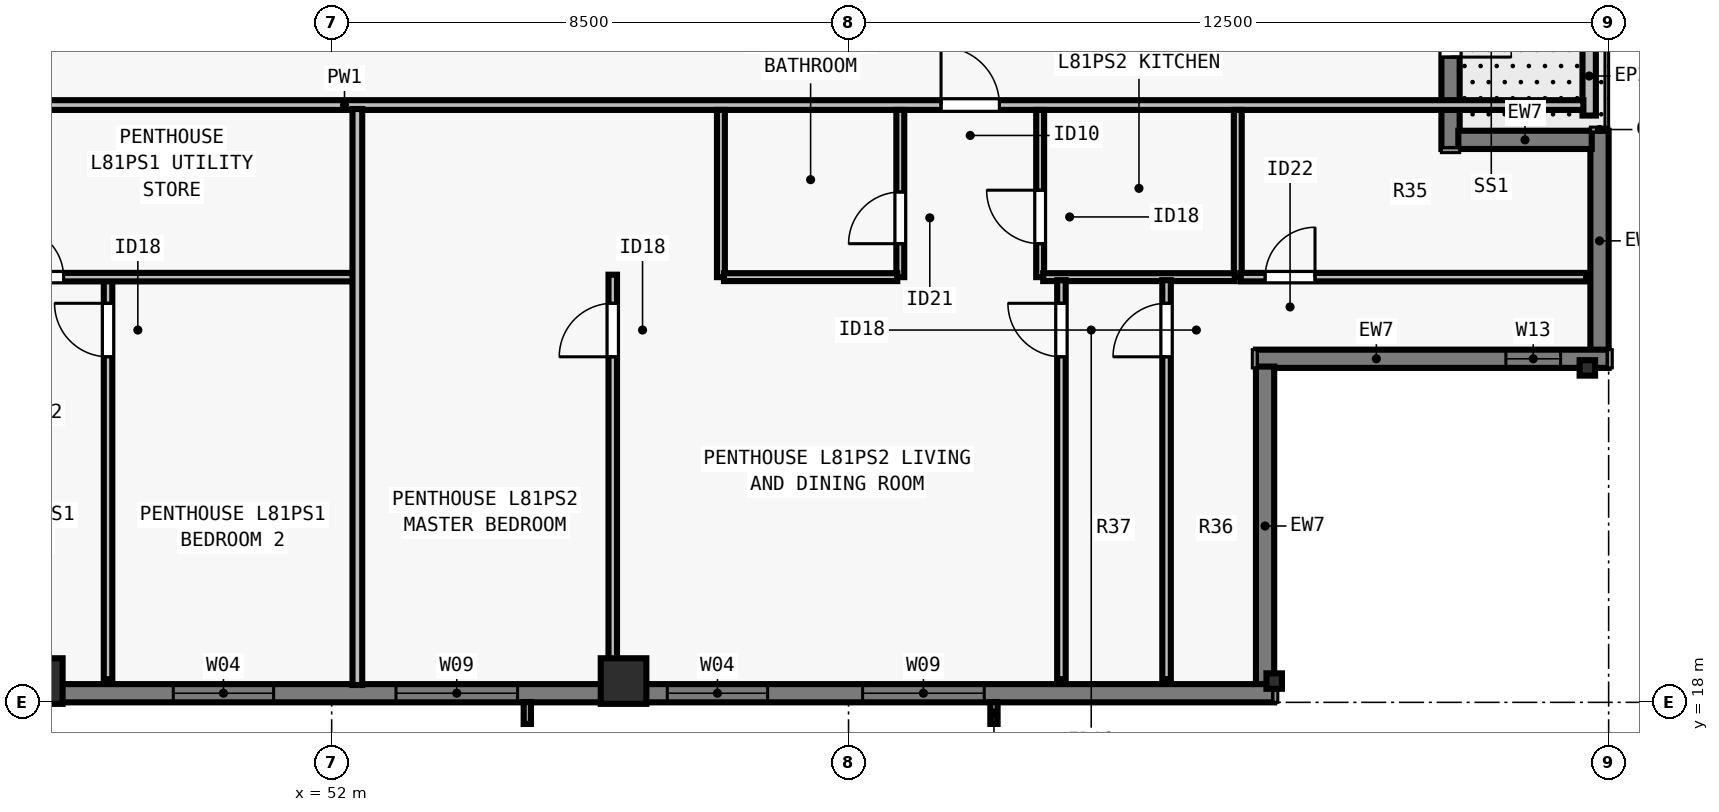
"""IFC4 building model, lengths in metres.
Left out: names, types, materials, properties, quantities, classifications, styles, units other than length and angle.
Written with IfcOpenShell. Run it as: python <this file> out.ifc"""

import sys

from ifc_helpers import new_model, si_unit, direction, frame, frame_2d, origin, origin_2d, place, context, subcontext, project, spatial, rectangle, i_section, extrude, element, fill, save


model = new_model("IFC4")
c1 = context("Model", 3, precision=1e-05, world=origin(), true_north=direction((0.0, 1.0)))
c2 = subcontext(c1, "Body", "Model", "MODEL_VIEW")
j1 = project(units=[si_unit("LENGTHUNIT", "METRE"), si_unit("PLANEANGLEUNIT", "RADIAN")], contexts=[c1])
p1 = place(None, origin())
s1 = spatial("IfcSite", under=j1, at=p1, CompositionType="ELEMENT")
p2 = place(p1, origin())
s2 = spatial("IfcBuilding", under=s1, at=p2, CompositionType="ELEMENT")
p3 = place(p2, frame((0.0, 0.0, 294.5)))
s3 = spatial("IfcBuildingStorey", under=s2, at=p3, CompositionType="ELEMENT", Elevation=294.5)
for number, where, z_axis, x_axis in (
    (1, (47.2, 18.35, 0.0), (0.0, 0.0, 1.0), (1.0, 0.0, 0.0)),
    (2, (56.8, 18.35, 0.0), (0.0, 0.0, 1.0), (1.0, 0.0, 0.0)),
):
    element("IfcColumn", number, at=place(p3, frame(where, z_axis=z_axis, x_axis=x_axis)), inside=s3, PredefinedType="COLUMN", context=c2, shape_type="SweptSolid", body=[
        extrude(rectangle(XDim=0.75, YDim=0.75, at=origin_2d()), origin(), (0.0, 0.0, 1.0), 3.5),
    ])
for number, where, z_axis, x_axis in (
    (3, (67.5, 18.35, 0.0), (0.0, 0.0, 1.0), (1.0, 0.0, 0.0)),
    (4, (72.65, 23.5, 0.0), (0.0, 0.0, 1.0), (0.0, 1.0, 0.0)),
):
    element("IfcColumn", number, at=place(p3, frame(where, z_axis=z_axis, x_axis=x_axis)), inside=s3, PredefinedType="COLUMN", context=c2, shape_type="SweptSolid", body=[
        extrude(i_section(OverallWidth=0.254, OverallDepth=0.254, WebThickness=0.009, FlangeThickness=0.014, FilletRadius=0.013, at=origin_2d()), origin(), (0.0, 0.0, 1.0), 3.5),
    ])
p4 = place(p3, frame((72.85, 27.4, 0.0), z_axis=(0.0, 0.0, 1.0), x_axis=(0.0, -1.0, 0.0)))
e5 = element("IfcWall", 5, at=p4, inside=s3, PredefinedType="SOLIDWALL", context=c2, shape_type="SweptSolid", body=[
    extrude(rectangle(XDim=3.622, YDim=0.3, at=frame_2d((1.811, 0.0))), origin(), (0.0, 0.0, 1.0), 3.29),
])
p5 = place(p3, frame((73.0, 23.65, 0.0), z_axis=(0.0, 0.0, 1.0), x_axis=(-1.0, 0.0, 0.0)))
e6 = element("IfcWall", 6, at=p5, inside=s3, PredefinedType="SOLIDWALL", context=c2, shape_type="SweptSolid", body=[
    extrude(rectangle(XDim=5.8, YDim=0.3, at=frame_2d((2.9, 0.0))), origin(), (0.0, 0.0, 1.0), 3.29),
])
p6 = place(p5, frame((0.79, 0.0, 0.8)))
e7 = element("IfcOpeningElement", 7, at=p6, cuts=e6, PredefinedType="OPENING", context=c2, shape_type="SweptSolid", body=[
    extrude(rectangle(XDim=0.9, YDim=1.75, at=frame_2d((0.45, 0.875))), frame((0.0, 0.16, 0.0), z_axis=(0.0, -1.0, 0.0), x_axis=(1.0, 0.0, 0.0)), (0.0, 0.0, 1.0), 0.32),
])
p7 = place(p3, frame((67.35, 23.522, 0.0), z_axis=(0.0, 0.0, 1.0), x_axis=(0.0, -1.0, 0.0)))
e8 = element("IfcWall", 8, at=p7, inside=s3, PredefinedType="SOLIDWALL", context=c2, shape_type="SweptSolid", body=[
    extrude(rectangle(XDim=5.244, YDim=0.3, at=frame_2d((2.622, 0.0))), origin(), (0.0, 0.0, 1.0), 3.29),
])
p8 = place(p3, frame((67.5, 18.15, 0.0), z_axis=(0.0, 0.0, 1.0), x_axis=(-1.0, 0.0, 0.0)))
e9 = element("IfcWall", 9, at=p8, inside=s3, PredefinedType="SOLIDWALL", context=c2, shape_type="SweptSolid", body=[
    extrude(rectangle(XDim=30.722, YDim=0.3, at=frame_2d((15.361, 0.0))), origin(), (0.0, 0.0, 1.0), 3.29),
])
p9 = place(p8, frame((4.769, 0.0, 0.8)))
e10 = element("IfcOpeningElement", 10, at=p9, cuts=e9, PredefinedType="OPENING", context=c2, shape_type="SweptSolid", body=[
    extrude(rectangle(XDim=2.0, YDim=1.758, at=frame_2d((1.0, 0.879))), frame((0.0, 0.16, 0.0), z_axis=(0.0, -1.0, 0.0), x_axis=(1.0, 0.0, 0.0)), (0.0, 0.0, 1.0), 0.32),
])
p10 = place(p8, frame((8.331, 0.0, 0.8)))
e11 = element("IfcOpeningElement", 11, at=p10, cuts=e9, PredefinedType="OPENING", context=c2, shape_type="SweptSolid", body=[
    extrude(rectangle(XDim=1.65, YDim=1.758, at=frame_2d((0.825, 0.879))), frame((0.0, 0.16, 0.0), z_axis=(0.0, -1.0, 0.0), x_axis=(1.0, 0.0, 0.0)), (0.0, 0.0, 1.0), 0.32),
])
p11 = place(p8, frame((12.442, 0.0, 0.8)))
e12 = element("IfcOpeningElement", 12, at=p11, cuts=e9, PredefinedType="OPENING", context=c2, shape_type="SweptSolid", body=[
    extrude(rectangle(XDim=2.0, YDim=1.758, at=frame_2d((1.0, 0.879))), frame((0.0, 0.16, 0.0), z_axis=(0.0, -1.0, 0.0), x_axis=(1.0, 0.0, 0.0)), (0.0, 0.0, 1.0), 0.32),
])
p12 = place(p8, frame((16.455, 0.0, 0.8)))
e13 = element("IfcOpeningElement", 13, at=p12, cuts=e9, PredefinedType="OPENING", context=c2, shape_type="SweptSolid", body=[
    extrude(rectangle(XDim=1.65, YDim=1.758, at=frame_2d((0.825, 0.879))), frame((0.0, 0.16, 0.0), z_axis=(0.0, -1.0, 0.0), x_axis=(1.0, 0.0, 0.0)), (0.0, 0.0, 1.0), 0.32),
])
p13 = place(p8, frame((20.967, 0.0, 0.8)))
e14 = element("IfcOpeningElement", 14, at=p13, cuts=e9, PredefinedType="OPENING", context=c2, shape_type="SweptSolid", body=[
    extrude(rectangle(XDim=2.0, YDim=1.758, at=frame_2d((1.0, 0.879))), frame((0.0, 0.16, 0.0), z_axis=(0.0, -1.0, 0.0), x_axis=(1.0, 0.0, 0.0)), (0.0, 0.0, 1.0), 0.32),
])
p14 = place(p8, frame((24.128, 0.0, 0.8)))
e15 = element("IfcOpeningElement", 15, at=p14, cuts=e9, PredefinedType="OPENING", context=c2, shape_type="SweptSolid", body=[
    extrude(rectangle(XDim=1.65, YDim=1.758, at=frame_2d((0.825, 0.879))), frame((0.0, 0.16, 0.0), z_axis=(0.0, -1.0, 0.0), x_axis=(1.0, 0.0, 0.0)), (0.0, 0.0, 1.0), 0.32),
])
p15 = place(p3, frame((70.4, 32.822, 0.0), z_axis=(0.0, 0.0, 1.0), x_axis=(0.0, -1.0, 0.0)))
e16 = element("IfcWall", 16, at=p15, inside=s3, PredefinedType="SOLIDWALL", context=c2, shape_type="SweptSolid", body=[
    extrude(rectangle(XDim=5.722, YDim=0.3, at=frame_2d((2.861, 0.0))), origin(), (0.0, 0.0, 1.0), 3.29),
])
p16 = place(p15, frame((3.211, 0.0, 0.0)))
e17 = element("IfcOpeningElement", 17, at=p16, cuts=e16, PredefinedType="OPENING", context=c2, shape_type="SweptSolid", body=[
    extrude(rectangle(XDim=1.0, YDim=2.15, at=frame_2d((0.5, 1.075))), frame((0.0, 0.16, 0.0), z_axis=(0.0, -1.0, 0.0), x_axis=(1.0, 0.0, 0.0)), (0.0, 0.0, 1.0), 0.32),
])
p17 = place(p3, frame((70.528, 27.25, 0.0), z_axis=(0.0, 0.0, 1.0), x_axis=(1.0, 0.0, 0.0)))
e18 = element("IfcWall", 18, at=p17, inside=s3, PredefinedType="SOLIDWALL", context=c2, shape_type="SweptSolid", body=[
    extrude(rectangle(XDim=2.194, YDim=0.3, at=frame_2d((1.097, 0.0))), origin(), (0.0, 0.0, 1.0), 3.29),
])
p18 = place(p3, frame((72.68, 27.65, 0.0), z_axis=(0.0, 0.0, 1.0), x_axis=(0.0, 1.0, 0.0)))
e19 = element("IfcWall", 19, at=p18, inside=s3, PredefinedType="PARAPET", context=c2, shape_type="SweptSolid", body=[
    extrude(rectangle(XDim=1.3, YDim=0.22, at=frame_2d((0.65, 0.0))), origin(), (0.0, 0.0, 1.0), 0.55),
])
p19 = place(p3, frame((31.285, 27.823, 0.0), z_axis=(0.0, 0.0, 1.0), x_axis=(1.0, 0.0, 0.0)))
e20 = element("IfcWall", 20, at=p19, inside=s3, PredefinedType="PARTITIONING", context=c2, shape_type="SweptSolid", body=[
    extrude(rectangle(XDim=41.3, YDim=0.16, at=frame_2d((20.65, 0.0))), origin(), (0.0, 0.0, 1.0), 3.009),
])
p20 = place(p19, frame((10.156, 0.0, 0.0)))
e21 = element("IfcOpeningElement", 21, at=p20, cuts=e20, PredefinedType="OPENING", context=c2, shape_type="SweptSolid", body=[
    extrude(rectangle(XDim=0.96, YDim=2.18, at=frame_2d((0.48, 1.09))), frame((0.0, 0.09, 0.0), z_axis=(0.0, -1.0, 0.0), x_axis=(1.0, 0.0, 0.0)), (0.0, 0.0, 1.0), 0.18),
])
p21 = place(p19, frame((30.736, 0.0, 0.0)))
e22 = element("IfcOpeningElement", 22, at=p21, cuts=e20, PredefinedType="OPENING", context=c2, shape_type="SweptSolid", body=[
    extrude(rectangle(XDim=0.96, YDim=2.18, at=frame_2d((0.48, 1.09))), frame((0.0, 0.09, 0.0), z_axis=(0.0, -1.0, 0.0), x_axis=(1.0, 0.0, 0.0)), (0.0, 0.0, 1.0), 0.18),
])
p22 = place(p3, frame((48.323, 18.38, 0.0), z_axis=(0.0, 0.0, 1.0), x_axis=(0.0, 1.0, 0.0)))
e23 = element("IfcWall", 23, at=p22, inside=s3, PredefinedType="PARTITIONING", context=c2, shape_type="SweptSolid", body=[
    extrude(rectangle(XDim=6.653, YDim=0.14, at=frame_2d((3.326, 0.0))), origin(), (0.0, 0.0, 1.0), 3.009),
])
p23 = place(p22, frame((5.302, 0.0, 0.0)))
e24 = element("IfcOpeningElement", 24, at=p23, cuts=e23, PredefinedType="OPENING", context=c2, shape_type="SweptSolid", body=[
    extrude(rectangle(XDim=0.88, YDim=2.1, at=frame_2d((0.44, 1.05))), frame((0.0, 0.08, 0.0), z_axis=(0.0, -1.0, 0.0), x_axis=(1.0, 0.0, 0.0)), (0.0, 0.0, 1.0), 0.16),
])
p24 = place(p3, frame((46.371, 24.992, 0.0), z_axis=(0.0, 0.0, 1.0), x_axis=(1.0, 0.0, 0.0)))
e25 = element("IfcWall", 25, at=p24, inside=s3, PredefinedType="PARTITIONING", context=c2, shape_type="SweptSolid", body=[
    extrude(rectangle(XDim=6.101, YDim=0.14, at=frame_2d((3.051, 0.0))), origin(), (0.0, 0.0, 1.0), 3.29),
])
p25 = place(p24, frame((0.4, 0.0, 0.0)))
e26 = element("IfcOpeningElement", 26, at=p25, cuts=e25, PredefinedType="OPENING", context=c2, shape_type="SweptSolid", body=[
    extrude(rectangle(XDim=0.82, YDim=2.1, at=frame_2d((0.41, 1.05))), frame((0.0, 0.08, 0.0), z_axis=(0.0, -1.0, 0.0), x_axis=(1.0, 0.0, 0.0)), (0.0, 0.0, 1.0), 0.16),
])
p26 = place(p3, frame((52.423, 18.285, 0.0), z_axis=(0.0, 0.0, 1.0), x_axis=(0.0, 1.0, 0.0)))
e27 = element("IfcWall", 27, at=p26, inside=s3, PredefinedType="PARTITIONING", context=c2, shape_type="SweptSolid", body=[
    extrude(rectangle(XDim=9.473, YDim=0.16, at=frame_2d((4.736, 0.0))), origin(), (0.0, 0.0, 1.0), 3.009),
])
p27 = place(p3, frame((58.401, 24.992, 0.0), z_axis=(0.0, 0.0, 1.0), x_axis=(0.0, 1.0, 0.0)))
e28 = element("IfcWall", 28, at=p27, inside=s3, PredefinedType="PLUMBINGWALL", context=c2, shape_type="SweptSolid", body=[
    extrude(rectangle(XDim=2.75, YDim=0.13, at=frame_2d((1.375, 0.0))), origin(), (0.0, 0.0, 1.0), 3.29),
])
p28 = place(p3, frame((61.351, 24.992, 0.0), z_axis=(0.0, 0.0, 1.0), x_axis=(0.0, 1.0, 0.0)))
e29 = element("IfcWall", 29, at=p28, inside=s3, PredefinedType="PLUMBINGWALL", context=c2, shape_type="SweptSolid", body=[
    extrude(rectangle(XDim=2.75, YDim=0.13, at=frame_2d((1.375, 0.0))), origin(), (0.0, 0.0, 1.0), 3.29),
])
p29 = place(p28, frame((0.55, 0.0, 0.0)))
e30 = element("IfcOpeningElement", 30, at=p29, cuts=e29, PredefinedType="OPENING", context=c2, shape_type="SweptSolid", body=[
    extrude(rectangle(XDim=0.85, YDim=2.08, at=frame_2d((0.425, 1.04))), frame((0.0, 0.075, 0.0), z_axis=(0.0, -1.0, 0.0), x_axis=(1.0, 0.0, 0.0)), (0.0, 0.0, 1.0), 0.15),
])
p30 = place(p3, frame((58.451, 24.992, 0.0), z_axis=(0.0, 0.0, 1.0), x_axis=(1.0, 0.0, 0.0)))
e31 = element("IfcWall", 31, at=p30, inside=s3, PredefinedType="PLUMBINGWALL", context=c2, shape_type="SweptSolid", body=[
    extrude(rectangle(XDim=2.85, YDim=0.13, at=frame_2d((1.425, 0.0))), origin(), (0.0, 0.0, 1.0), 3.29),
])
p31 = place(p3, frame((66.901, 24.992, 0.0), z_axis=(0.0, 0.0, 1.0), x_axis=(0.0, 1.0, 0.0)))
e32 = element("IfcWall", 32, at=p31, inside=s3, PredefinedType="PLUMBINGWALL", context=c2, shape_type="SweptSolid", body=[
    extrude(rectangle(XDim=2.75, YDim=0.13, at=frame_2d((1.375, 0.0))), origin(), (0.0, 0.0, 1.0), 3.29),
])
p32 = place(p3, frame((63.651, 24.992, 0.0), z_axis=(0.0, 0.0, 1.0), x_axis=(0.0, 1.0, 0.0)))
e33 = element("IfcWall", 33, at=p32, inside=s3, PredefinedType="PLUMBINGWALL", context=c2, shape_type="SweptSolid", body=[
    extrude(rectangle(XDim=2.75, YDim=0.13, at=frame_2d((1.375, 0.0))), origin(), (0.0, 0.0, 1.0), 2.653),
])
p33 = place(p32, frame((0.55, 0.0, 0.0)))
e34 = element("IfcOpeningElement", 34, at=p33, cuts=e33, PredefinedType="OPENING", context=c2, shape_type="SweptSolid", body=[
    extrude(rectangle(XDim=0.88, YDim=2.1, at=frame_2d((0.44, 1.05))), frame((0.0, 0.075, 0.0), z_axis=(0.0, -1.0, 0.0), x_axis=(1.0, 0.0, 0.0)), (0.0, 0.0, 1.0), 0.15),
])
p34 = place(p3, frame((63.701, 24.992, 0.0), z_axis=(0.0, 0.0, 1.0), x_axis=(1.0, 0.0, 0.0)))
e35 = element("IfcWall", 35, at=p34, inside=s3, PredefinedType="PLUMBINGWALL", context=c2, shape_type="SweptSolid", body=[
    extrude(rectangle(XDim=3.15, YDim=0.13, at=frame_2d((1.575, 0.0))), origin(), (0.0, 0.0, 1.0), 3.29),
])
p35 = place(p3, frame((56.623, 18.38, 0.0), z_axis=(0.0, 0.0, 1.0), x_axis=(0.0, 1.0, 0.0)))
e36 = element("IfcWall", 36, at=p35, inside=s3, PredefinedType="PARTITIONING", context=c2, shape_type="SweptSolid", body=[
    extrude(rectangle(XDim=6.653, YDim=0.14, at=frame_2d((3.326, 0.0))), origin(), (0.0, 0.0, 1.0), 2.653),
])
p36 = place(p35, frame((5.302, 0.0, 0.0)))
e37 = element("IfcOpeningElement", 37, at=p36, cuts=e36, PredefinedType="OPENING", context=c2, shape_type="SweptSolid", body=[
    extrude(rectangle(XDim=0.88, YDim=2.1, at=frame_2d((0.44, 1.05))), frame((0.0, 0.08, 0.0), z_axis=(0.0, -1.0, 0.0), x_axis=(1.0, 0.0, 0.0)), (0.0, 0.0, 1.0), 0.16),
])
p37 = place(p3, frame((65.73, 18.38, 0.0), z_axis=(0.0, 0.0, 1.0), x_axis=(0.0, 1.0, 0.0)))
e38 = element("IfcWall", 38, at=p37, inside=s3, PredefinedType="PARTITIONING", context=c2, shape_type="SweptSolid", body=[
    extrude(rectangle(XDim=6.562, YDim=0.14, at=frame_2d((3.281, 0.0))), origin(), (0.0, 0.0, 1.0), 2.653),
])
p38 = place(p37, frame((5.302, 0.0, 0.0)))
e39 = element("IfcOpeningElement", 39, at=p38, cuts=e38, PredefinedType="OPENING", context=c2, shape_type="SweptSolid", body=[
    extrude(rectangle(XDim=0.88, YDim=2.1, at=frame_2d((0.44, 1.05))), frame((0.0, 0.08, 0.0), z_axis=(0.0, -1.0, 0.0), x_axis=(1.0, 0.0, 0.0)), (0.0, 0.0, 1.0), 0.16),
])
p39 = place(p3, frame((66.951, 24.992, 0.0), z_axis=(0.0, 0.0, 1.0), x_axis=(1.0, 0.0, 0.0)))
e40 = element("IfcWall", 40, at=p39, inside=s3, PredefinedType="PARTITIONING", context=c2, shape_type="SweptSolid", body=[
    extrude(rectangle(XDim=5.679, YDim=0.14, at=frame_2d((2.839, 0.0))), origin(), (0.0, 0.0, 1.0), 3.009),
])
p40 = place(p39, frame((0.4, 0.0, 0.0)))
e41 = element("IfcOpeningElement", 41, at=p40, cuts=e40, PredefinedType="OPENING", context=c2, shape_type="SweptSolid", body=[
    extrude(rectangle(XDim=0.82, YDim=2.1, at=frame_2d((0.41, 1.05))), frame((0.0, 0.08, 0.0), z_axis=(0.0, -1.0, 0.0), x_axis=(1.0, 0.0, 0.0)), (0.0, 0.0, 1.0), 0.16),
])
p41 = place(p3, frame((64.001, 18.38, 0.0), z_axis=(0.0, 0.0, 1.0), x_axis=(0.0, 1.0, 0.0)))
e42 = element("IfcWall", 42, at=p41, inside=s3, PredefinedType="PARTITIONING", context=c2, shape_type="SweptSolid", body=[
    extrude(rectangle(XDim=6.562, YDim=0.14, at=frame_2d((3.281, 0.0))), origin(), (0.0, 0.0, 1.0), 2.653),
])
p42 = place(p41, frame((5.302, 0.0, 0.0)))
e43 = element("IfcOpeningElement", 43, at=p42, cuts=e42, PredefinedType="OPENING", context=c2, shape_type="SweptSolid", body=[
    extrude(rectangle(XDim=0.88, YDim=2.1, at=frame_2d((0.44, 1.05))), frame((0.0, 0.08, 0.0), z_axis=(0.0, -1.0, 0.0), x_axis=(1.0, 0.0, 0.0)), (0.0, 0.0, 1.0), 0.16),
])
p43 = place(p9, origin())
e44 = element("IfcWindow", 44, at=p43, inside=s3, PartitioningType="SINGLE_PANEL", PredefinedType="WINDOW", context=c2, shape_type="SweptSolid", body=[
    extrude(rectangle(XDim=2.0, YDim=1.758, at=frame_2d((1.0, 0.879))), frame((0.0, -0.05, 0.0), z_axis=(0.0, -1.0, 0.0), x_axis=(1.0, 0.0, 0.0)), (0.0, 0.0, 1.0), 0.06),
])
fill(e10, e44)
p44 = place(p10, origin())
e45 = element("IfcWindow", 45, at=p44, inside=s3, PartitioningType="SINGLE_PANEL", PredefinedType="WINDOW", context=c2, shape_type="SweptSolid", body=[
    extrude(rectangle(XDim=1.65, YDim=1.758, at=frame_2d((0.825, 0.879))), frame((0.0, -0.05, 0.0), z_axis=(0.0, -1.0, 0.0), x_axis=(1.0, 0.0, 0.0)), (0.0, 0.0, 1.0), 0.06),
])
fill(e11, e45)
p45 = place(p11, origin())
e46 = element("IfcWindow", 46, at=p45, inside=s3, PartitioningType="SINGLE_PANEL", PredefinedType="WINDOW", context=c2, shape_type="SweptSolid", body=[
    extrude(rectangle(XDim=2.0, YDim=1.758, at=frame_2d((1.0, 0.879))), frame((0.0, -0.05, 0.0), z_axis=(0.0, -1.0, 0.0), x_axis=(1.0, 0.0, 0.0)), (0.0, 0.0, 1.0), 0.06),
])
fill(e12, e46)
p46 = place(p12, origin())
e47 = element("IfcWindow", 47, at=p46, inside=s3, PartitioningType="SINGLE_PANEL", PredefinedType="WINDOW", context=c2, shape_type="SweptSolid", body=[
    extrude(rectangle(XDim=1.65, YDim=1.758, at=frame_2d((0.825, 0.879))), frame((0.0, -0.05, 0.0), z_axis=(0.0, -1.0, 0.0), x_axis=(1.0, 0.0, 0.0)), (0.0, 0.0, 1.0), 0.06),
])
fill(e13, e47)
p47 = place(p16, origin())
e48 = element("IfcDoor", 48, at=p47, inside=s3, OperationType="SINGLE_SWING_RIGHT", PredefinedType="DOOR", context=c2, shape_type="SweptSolid", body=[
    extrude(rectangle(XDim=1.0, YDim=2.15, at=frame_2d((0.5, 1.075))), frame((0.0, 0.025, 0.0), z_axis=(0.0, -1.0, 0.0), x_axis=(1.0, 0.0, 0.0)), (0.0, 0.0, 1.0), 0.05),
])
fill(e17, e48)
p48 = place(p6, origin())
e49 = element("IfcWindow", 49, at=p48, inside=s3, PartitioningType="SINGLE_PANEL", PredefinedType="WINDOW", context=c2, shape_type="SweptSolid", body=[
    extrude(rectangle(XDim=0.9, YDim=1.75, at=frame_2d((0.45, 0.875))), frame((0.0, -0.04, 0.0), z_axis=(0.0, -1.0, 0.0), x_axis=(1.0, 0.0, 0.0)), (0.0, 0.0, 1.0), 0.06),
])
fill(e7, e49)
p49 = place(p25, origin())
e50 = element("IfcDoor", 50, at=p49, inside=s3, OperationType="SINGLE_SWING_LEFT", PredefinedType="DOOR", context=c2, shape_type="SweptSolid", body=[
    extrude(rectangle(XDim=0.82, YDim=2.1, at=frame_2d((0.41, 1.05))), frame((0.0, 0.025, 0.0), z_axis=(0.0, -1.0, 0.0), x_axis=(1.0, 0.0, 0.0)), (0.0, 0.0, 1.0), 0.05),
])
fill(e26, e50)
p50 = place(p23, origin())
e51 = element("IfcDoor", 51, at=p50, inside=s3, OperationType="SINGLE_SWING_RIGHT", PredefinedType="DOOR", context=c2, shape_type="SweptSolid", body=[
    extrude(rectangle(XDim=0.88, YDim=2.1, at=frame_2d((0.44, 1.05))), frame((0.0, 0.025, 0.0), z_axis=(0.0, -1.0, 0.0), x_axis=(1.0, 0.0, 0.0)), (0.0, 0.0, 1.0), 0.05),
])
fill(e24, e51)
p51 = place(p29, origin())
e52 = element("IfcDoor", 52, at=p51, inside=s3, OperationType="SINGLE_SWING_LEFT", PredefinedType="DOOR", context=c2, shape_type="SweptSolid", body=[
    extrude(rectangle(XDim=0.85, YDim=2.08, at=frame_2d((0.425, 1.04))), frame((0.0, 0.025, 0.0), z_axis=(0.0, -1.0, 0.0), x_axis=(1.0, 0.0, 0.0)), (0.0, 0.0, 1.0), 0.05),
])
fill(e30, e52)
p52 = place(p33, origin())
e53 = element("IfcDoor", 53, at=p52, inside=s3, OperationType="SINGLE_SWING_RIGHT", PredefinedType="DOOR", context=c2, shape_type="SweptSolid", body=[
    extrude(rectangle(XDim=0.88, YDim=2.1, at=frame_2d((0.44, 1.05))), frame((0.0, 0.025, 0.0), z_axis=(0.0, -1.0, 0.0), x_axis=(1.0, 0.0, 0.0)), (0.0, 0.0, 1.0), 0.05),
])
fill(e34, e53)
p53 = place(p36, origin())
e54 = element("IfcDoor", 54, at=p53, inside=s3, OperationType="SINGLE_SWING_LEFT", PredefinedType="DOOR", context=c2, shape_type="SweptSolid", body=[
    extrude(rectangle(XDim=0.88, YDim=2.1, at=frame_2d((0.44, 1.05))), frame((0.0, 0.025, 0.0), z_axis=(0.0, -1.0, 0.0), x_axis=(1.0, 0.0, 0.0)), (0.0, 0.0, 1.0), 0.05),
])
fill(e37, e54)
p54 = place(p40, origin())
e55 = element("IfcDoor", 55, at=p54, inside=s3, OperationType="SINGLE_SWING_RIGHT", PredefinedType="DOOR", context=c2, shape_type="SweptSolid", body=[
    extrude(rectangle(XDim=0.82, YDim=2.1, at=frame_2d((0.41, 1.05))), frame((0.0, 0.025, 0.0), z_axis=(0.0, -1.0, 0.0), x_axis=(1.0, 0.0, 0.0)), (0.0, 0.0, 1.0), 0.05),
])
fill(e41, e55)
p55 = place(p38, origin())
e56 = element("IfcDoor", 56, at=p55, inside=s3, OperationType="SINGLE_SWING_LEFT", PredefinedType="DOOR", context=c2, shape_type="SweptSolid", body=[
    extrude(rectangle(XDim=0.88, YDim=2.1, at=frame_2d((0.44, 1.05))), frame((0.0, 0.025, 0.0), z_axis=(0.0, -1.0, 0.0), x_axis=(1.0, 0.0, 0.0)), (0.0, 0.0, 1.0), 0.05),
])
fill(e39, e56)
p56 = place(p42, origin())
e57 = element("IfcDoor", 57, at=p56, inside=s3, OperationType="SINGLE_SWING_RIGHT", PredefinedType="DOOR", context=c2, shape_type="SweptSolid", body=[
    extrude(rectangle(XDim=0.88, YDim=2.1, at=frame_2d((0.44, 1.05))), frame((0.0, 0.025, 0.0), z_axis=(0.0, -1.0, 0.0), x_axis=(1.0, 0.0, 0.0)), (0.0, 0.0, 1.0), 0.05),
])
fill(e43, e57)
p57 = place(p21, origin())
e58 = element("IfcDoor", 58, at=p57, inside=s3, OperationType="SINGLE_SWING_LEFT", PredefinedType="DOOR", context=c2, shape_type="SweptSolid", body=[
    extrude(rectangle(XDim=0.96, YDim=2.18, at=frame_2d((0.48, 1.09))), frame((0.0, 0.025, 0.0), z_axis=(0.0, -1.0, 0.0), x_axis=(1.0, 0.0, 0.0)), (0.0, 0.0, 1.0), 0.05),
])
fill(e22, e58)
save(model, sys.argv[1])
